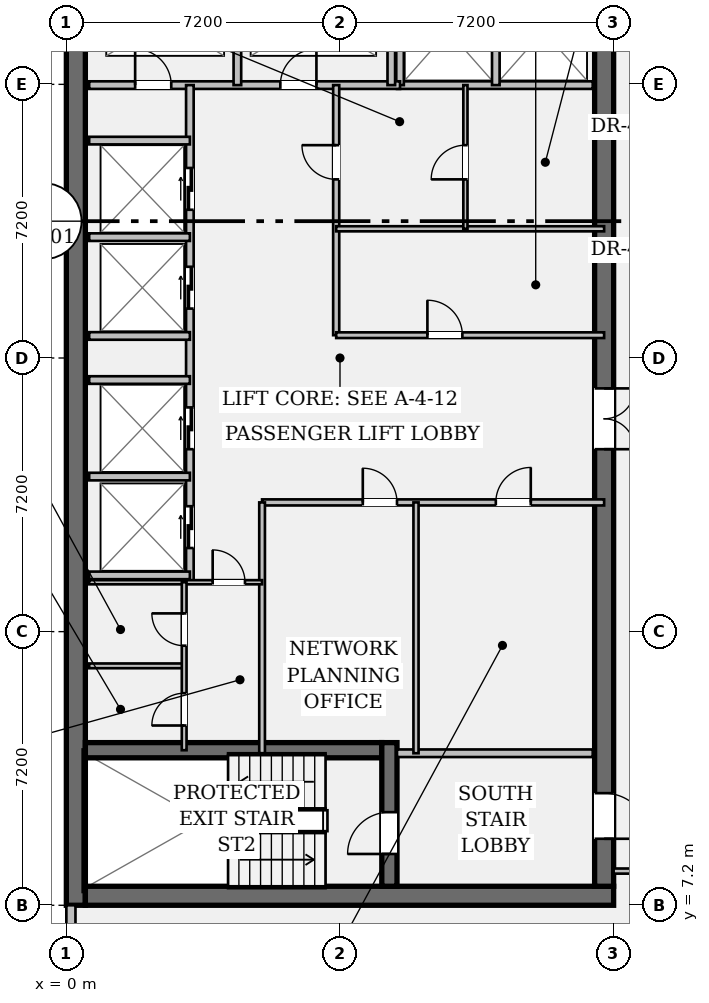
"""IFC4 building model, lengths in metres.
Left out: names, types, materials, properties, quantities, classifications, styles, units other than length and angle.
Written with IfcOpenShell. Run it as: python <this file> out.ifc"""

import sys

from ifc_helpers import new_model, si_unit, direction, frame, frame_2d, origin, place, context, subcontext, project, spatial, rectangle, extrude, element, fill, save


model = new_model("IFC4")
c1 = context("Model", 3, precision=1e-05, world=origin(), true_north=direction((0.0, 1.0)))
c2 = subcontext(c1, "Body", "Model", "MODEL_VIEW")
j1 = project(units=[si_unit("LENGTHUNIT", "METRE"), si_unit("PLANEANGLEUNIT", "RADIAN")], contexts=[c1])
p1 = place(None, origin())
s1 = spatial("IfcSite", under=j1, at=p1, CompositionType="ELEMENT")
p2 = place(p1, origin())
s2 = spatial("IfcBuilding", under=s1, at=p2, CompositionType="ELEMENT")
p3 = place(p2, frame((0.0, 0.0, 215.25)))
s3 = spatial("IfcBuildingStorey", under=s2, at=p3, CompositionType="ELEMENT", Elevation=215.25)
p4 = place(p3, frame((0.25, 7.2, 0.0), z_axis=(0.0, 0.0, 1.0), x_axis=(0.0, 1.0, 0.0)))
e1 = element("IfcWall", 1, at=p4, inside=s3, PredefinedType="SHEAR", context=c2, shape_type="SweptSolid", body=[
    extrude(rectangle(XDim=28.8, YDim=0.5, at=frame_2d((14.4, 0.0))), origin(), (0.0, 0.0, 1.0), 3.24),
])
p5 = place(p3, frame((0.5, 7.45, 0.0), z_axis=(0.0, 0.0, 1.0), x_axis=(1.0, 0.0, 0.0)))
e2 = element("IfcWall", 2, at=p5, inside=s3, PredefinedType="SHEAR", context=c2, shape_type="SweptSolid", body=[
    extrude(rectangle(XDim=13.9, YDim=0.5, at=frame_2d((6.95, 0.0))), origin(), (0.0, 0.0, 1.0), 3.24),
])
p6 = place(p3, frame((14.15, 35.5, 0.0), z_axis=(0.0, 0.0, 1.0), x_axis=(0.0, -1.0, 0.0)))
e3 = element("IfcWall", 3, at=p6, inside=s3, PredefinedType="SHEAR", context=c2, shape_type="SweptSolid", body=[
    extrude(rectangle(XDim=27.8, YDim=0.5, at=frame_2d((13.9, 0.0))), origin(), (0.0, 0.0, 1.0), 3.24),
])
p7 = place(p6, frame((1.4, 0.0, 0.0)))
e4 = element("IfcOpeningElement", 4, at=p7, cuts=e3, PredefinedType="OPENING", context=c2, shape_type="SweptSolid", body=[
    extrude(rectangle(XDim=1.2, YDim=2.15, at=frame_2d((0.6, 1.075))), frame((0.0, 0.262, 0.0), z_axis=(0.0, -1.0, 0.0), x_axis=(1.0, 0.0, 0.0)), (0.0, 0.0, 1.0), 0.524),
])
p8 = place(p6, frame((25.35, 0.0, 0.0)))
e5 = element("IfcOpeningElement", 5, at=p8, cuts=e3, PredefinedType="OPENING", context=c2, shape_type="SweptSolid", body=[
    extrude(rectangle(XDim=1.2, YDim=2.15, at=frame_2d((0.6, 1.075))), frame((0.0, 0.262, 0.0), z_axis=(0.0, -1.0, 0.0), x_axis=(1.0, 0.0, 0.0)), (0.0, 0.0, 1.0), 0.524),
])
p9 = place(p6, frame((14.7, 0.0, 0.0)))
e6 = element("IfcOpeningElement", 6, at=p9, cuts=e3, PredefinedType="OPENING", context=c2, shape_type="SweptSolid", body=[
    extrude(rectangle(XDim=1.6, YDim=2.2, at=frame_2d((0.8, 1.1))), frame((0.0, 0.262, 0.0), z_axis=(0.0, -1.0, 0.0), x_axis=(1.0, 0.0, 0.0)), (0.0, 0.0, 1.0), 0.524),
])
p10 = place(p3, frame((0.5, 11.28, 0.0), z_axis=(0.0, 0.0, 1.0), x_axis=(1.0, 0.0, 0.0)))
e7 = element("IfcWall", 7, at=p10, inside=s3, PredefinedType="SHEAR", context=c2, shape_type="SweptSolid", body=[
    extrude(rectangle(XDim=7.8, YDim=0.4, at=frame_2d((3.9, 0.0))), origin(), (0.0, 0.0, 1.0), 3.24),
])
p11 = place(p3, frame((8.5, 7.7, 0.0), z_axis=(0.0, 0.0, 1.0), x_axis=(0.0, 1.0, 0.0)))
e8 = element("IfcWall", 8, at=p11, inside=s3, PredefinedType="SHEAR", context=c2, shape_type="SweptSolid", body=[
    extrude(rectangle(XDim=3.78, YDim=0.4, at=frame_2d((1.89, 0.0))), origin(), (0.0, 0.0, 1.0), 3.24),
])
p12 = place(p11, frame((0.85, 0.0, 0.0)))
e9 = element("IfcOpeningElement", 9, at=p12, cuts=e8, PredefinedType="OPENING", context=c2, shape_type="SweptSolid", body=[
    extrude(rectangle(XDim=1.1, YDim=2.15, at=frame_2d((0.55, 1.075))), frame((0.0, 0.212, 0.0), z_axis=(0.0, -1.0, 0.0), x_axis=(1.0, 0.0, 0.0)), (0.0, 0.0, 1.0), 0.424),
])
p13 = place(p3, frame((0.12, 5.95, 0.0), z_axis=(0.0, 0.0, 1.0), x_axis=(0.0, 1.0, 0.0)))
e10 = element("IfcWall", 10, at=p13, inside=s3, PredefinedType="STANDARD", context=c2, shape_type="SweptSolid", body=[
    extrude(rectangle(XDim=1.25, YDim=0.24, at=frame_2d((0.625, 0.0))), origin(), (0.0, 0.0, 1.0), 3.24),
])
for number, where, z_axis, x_axis in (
    (11, (8.7, 11.2, 0.0), (0.0, 0.0, 1.0), (1.0, 0.0, 0.0)),
    (12, (8.7, 28.78, 0.0), (0.0, 0.0, 1.0), (1.0, 0.0, 0.0)),
):
    element("IfcWall", number, at=place(p3, frame(where, z_axis=z_axis, x_axis=x_axis)), inside=s3, PredefinedType="PARTITIONING", context=c2, shape_type="SweptSolid", body=[
        extrude(rectangle(XDim=5.15, YDim=0.2, at=frame_2d((2.575, 0.0))), origin(), (0.0, 0.0, 1.0), 3.24),
    ])
for number, where, z_axis, x_axis in (
    (13, (8.78, 28.78, 0.0), (0.0, 0.0, 1.0), (0.0, 1.0, 0.0)),
    (14, (11.3, 28.78, 0.0), (0.0, 0.0, 1.0), (0.0, 1.0, 0.0)),
):
    element("IfcWall", number, at=place(p3, frame(where, z_axis=z_axis, x_axis=x_axis)), inside=s3, PredefinedType="PARTITIONING", context=c2, shape_type="SweptSolid", body=[
        extrude(rectangle(XDim=3.1, YDim=0.2, at=frame_2d((1.55, 0.0))), origin(), (0.0, 0.0, 1.0), 3.24),
    ])
p14 = place(p3, frame((0.6, 28.78, 0.0), z_axis=(0.0, 0.0, 1.0), x_axis=(1.0, 0.0, 0.0)))
e15 = element("IfcWall", 15, at=p14, inside=s3, PredefinedType="PARTITIONING", context=c2, shape_type="SweptSolid", body=[
    extrude(rectangle(XDim=8.18, YDim=0.2, at=frame_2d((4.09, 0.0))), origin(), (0.0, 0.0, 1.0), 3.24),
])
p15 = place(p14, frame((1.21, 0.0, 0.0)))
e16 = element("IfcOpeningElement", 16, at=p15, cuts=e15, PredefinedType="OPENING", context=c2, shape_type="SweptSolid", body=[
    extrude(rectangle(XDim=0.95, YDim=2.15, at=frame_2d((0.475, 1.075))), frame((0.0, 0.112, 0.0), z_axis=(0.0, -1.0, 0.0), x_axis=(1.0, 0.0, 0.0)), (0.0, 0.0, 1.0), 0.224),
])
p16 = place(p14, frame((5.03, 0.0, 0.0)))
e17 = element("IfcOpeningElement", 17, at=p16, cuts=e15, PredefinedType="OPENING", context=c2, shape_type="SweptSolid", body=[
    extrude(rectangle(XDim=0.95, YDim=2.15, at=frame_2d((0.475, 1.075))), frame((0.0, 0.112, 0.0), z_axis=(0.0, -1.0, 0.0), x_axis=(1.0, 0.0, 0.0)), (0.0, 0.0, 1.0), 0.224),
])
for number, where, z_axis, x_axis in (
    (18, (4.5, 28.78, 0.0), (0.0, 0.0, 1.0), (0.0, 1.0, 0.0)),
    (19, (8.55, 28.78, 0.0), (0.0, 0.0, 1.0), (0.0, 1.0, 0.0)),
):
    element("IfcWall", number, at=place(p3, frame(where, z_axis=z_axis, x_axis=x_axis)), inside=s3, PredefinedType="PARTITIONING", context=c2, shape_type="SweptSolid", body=[
        extrude(rectangle(XDim=2.94, YDim=0.2, at=frame_2d((1.47, 0.0))), origin(), (0.0, 0.0, 1.0), 3.24),
    ])
p17 = place(p3, frame((3.25, 15.7, 0.0), z_axis=(0.0, 0.0, 1.0), x_axis=(0.0, 1.0, 0.0)))
e20 = element("IfcWall", 20, at=p17, inside=s3, PredefinedType="PARTITIONING", context=c2, shape_type="SweptSolid", body=[
    extrude(rectangle(XDim=13.08, YDim=0.2, at=frame_2d((6.54, 0.0))), origin(), (0.0, 0.0, 1.0), 3.24),
])
p18 = place(p17, frame((0.9, 0.0, 0.0)))
e21 = element("IfcOpeningElement", 21, at=p18, cuts=e20, PredefinedType="OPENING", context=c2, shape_type="SweptSolid", body=[
    extrude(rectangle(XDim=1.1, YDim=2.2, at=frame_2d((0.55, 1.1))), frame((0.0, 0.112, 0.0), z_axis=(0.0, -1.0, 0.0), x_axis=(1.0, 0.0, 0.0)), (0.0, 0.0, 1.0), 0.224),
])
p19 = place(p17, frame((3.5, 0.0, 0.0)))
e22 = element("IfcOpeningElement", 22, at=p19, cuts=e20, PredefinedType="OPENING", context=c2, shape_type="SweptSolid", body=[
    extrude(rectangle(XDim=1.1, YDim=2.2, at=frame_2d((0.55, 1.1))), frame((0.0, 0.112, 0.0), z_axis=(0.0, -1.0, 0.0), x_axis=(1.0, 0.0, 0.0)), (0.0, 0.0, 1.0), 0.224),
])
p20 = place(p17, frame((7.2, 0.0, 0.0)))
e23 = element("IfcOpeningElement", 23, at=p20, cuts=e20, PredefinedType="OPENING", context=c2, shape_type="SweptSolid", body=[
    extrude(rectangle(XDim=1.1, YDim=2.2, at=frame_2d((0.55, 1.1))), frame((0.0, 0.112, 0.0), z_axis=(0.0, -1.0, 0.0), x_axis=(1.0, 0.0, 0.0)), (0.0, 0.0, 1.0), 0.224),
])
p21 = place(p17, frame((9.8, 0.0, 0.0)))
e24 = element("IfcOpeningElement", 24, at=p21, cuts=e20, PredefinedType="OPENING", context=c2, shape_type="SweptSolid", body=[
    extrude(rectangle(XDim=1.1, YDim=2.2, at=frame_2d((0.55, 1.1))), frame((0.0, 0.112, 0.0), z_axis=(0.0, -1.0, 0.0), x_axis=(1.0, 0.0, 0.0)), (0.0, 0.0, 1.0), 0.224),
])
for number, where, z_axis, x_axis in (
    (25, (0.6, 15.88, 0.0), (0.0, 0.0, 1.0), (1.0, 0.0, 0.0)),
    (26, (0.6, 18.48, 0.0), (0.0, 0.0, 1.0), (1.0, 0.0, 0.0)),
    (27, (0.6, 22.18, 0.0), (0.0, 0.0, 1.0), (1.0, 0.0, 0.0)),
    (28, (0.6, 24.78, 0.0), (0.0, 0.0, 1.0), (1.0, 0.0, 0.0)),
    (29, (0.6, 21.02, 0.0), (0.0, 0.0, 1.0), (1.0, 0.0, 0.0)),
    (30, (0.6, 27.32, 0.0), (0.0, 0.0, 1.0), (1.0, 0.0, 0.0)),
):
    element("IfcWall", number, at=place(p3, frame(where, z_axis=z_axis, x_axis=x_axis)), inside=s3, PredefinedType="PARTITIONING", context=c2, shape_type="SweptSolid", body=[
        extrude(rectangle(XDim=2.65, YDim=0.2, at=frame_2d((1.325, 0.0))), origin(), (0.0, 0.0, 1.0), 3.24),
    ])
p22 = place(p3, frame((7.1, 22.2, 0.0), z_axis=(0.0, 0.0, 1.0), x_axis=(0.0, 1.0, 0.0)))
e31 = element("IfcWall", 31, at=p22, inside=s3, PredefinedType="PARTITIONING", context=c2, shape_type="SweptSolid", body=[
    extrude(rectangle(XDim=6.58, YDim=0.16, at=frame_2d((3.29, 0.0))), origin(), (0.0, 0.0, 1.0), 3.24),
])
p23 = place(p22, frame((4.1, 0.0, 0.0)))
e32 = element("IfcOpeningElement", 32, at=p23, cuts=e31, PredefinedType="OPENING", context=c2, shape_type="SweptSolid", body=[
    extrude(rectangle(XDim=0.9, YDim=2.15, at=frame_2d((0.45, 1.075))), frame((0.0, 0.092, 0.0), z_axis=(0.0, -1.0, 0.0), x_axis=(1.0, 0.0, 0.0)), (0.0, 0.0, 1.0), 0.184),
])
p24 = place(p3, frame((7.1, 22.2, 0.0), z_axis=(0.0, 0.0, 1.0), x_axis=(1.0, 0.0, 0.0)))
e33 = element("IfcWall", 33, at=p24, inside=s3, PredefinedType="PARTITIONING", context=c2, shape_type="SweptSolid", body=[
    extrude(rectangle(XDim=7.05, YDim=0.15, at=frame_2d((3.525, 0.0))), origin(), (0.0, 0.0, 1.0), 3.24),
])
p25 = place(p24, frame((2.4, 0.0, 0.0)))
e34 = element("IfcOpeningElement", 34, at=p25, cuts=e33, PredefinedType="OPENING", context=c2, shape_type="SweptSolid", body=[
    extrude(rectangle(XDim=0.92, YDim=2.15, at=frame_2d((0.46, 1.075))), frame((0.0, 0.087, 0.0), z_axis=(0.0, -1.0, 0.0), x_axis=(1.0, 0.0, 0.0)), (0.0, 0.0, 1.0), 0.174),
])
p26 = place(p3, frame((7.1, 25.0, 0.0), z_axis=(0.0, 0.0, 1.0), x_axis=(1.0, 0.0, 0.0)))
e35 = element("IfcWall", 35, at=p26, inside=s3, PredefinedType="PARTITIONING", context=c2, shape_type="SweptSolid", body=[
    extrude(rectangle(XDim=7.05, YDim=0.135, at=frame_2d((3.525, 0.0))), origin(), (0.0, 0.0, 1.0), 3.24),
])
p27 = place(p3, frame((10.5, 25.0, 0.0), z_axis=(0.0, 0.0, 1.0), x_axis=(0.0, 1.0, 0.0)))
e36 = element("IfcWall", 36, at=p27, inside=s3, PredefinedType="PARTITIONING", context=c2, shape_type="SweptSolid", body=[
    extrude(rectangle(XDim=3.78, YDim=0.11, at=frame_2d((1.89, 0.0))), origin(), (0.0, 0.0, 1.0), 3.24),
])
p28 = place(p27, frame((1.3, 0.0, 0.0)))
e37 = element("IfcOpeningElement", 37, at=p28, cuts=e36, PredefinedType="OPENING", context=c2, shape_type="SweptSolid", body=[
    extrude(rectangle(XDim=0.9, YDim=2.15, at=frame_2d((0.45, 1.075))), frame((0.0, 0.067, 0.0), z_axis=(0.0, -1.0, 0.0), x_axis=(1.0, 0.0, 0.0)), (0.0, 0.0, 1.0), 0.134),
])
p29 = place(p3, frame((5.15, 17.8, 0.0), z_axis=(0.0, 0.0, 1.0), x_axis=(1.0, 0.0, 0.0)))
e38 = element("IfcWall", 38, at=p29, inside=s3, PredefinedType="PARTITIONING", context=c2, shape_type="SweptSolid", body=[
    extrude(rectangle(XDim=9.0, YDim=0.16, at=frame_2d((4.5, 0.0))), origin(), (0.0, 0.0, 1.0), 3.24),
])
p30 = place(p29, frame((2.65, 0.0, 0.0)))
e39 = element("IfcOpeningElement", 39, at=p30, cuts=e38, PredefinedType="OPENING", context=c2, shape_type="SweptSolid", body=[
    extrude(rectangle(XDim=0.9, YDim=2.15, at=frame_2d((0.45, 1.075))), frame((0.0, 0.092, 0.0), z_axis=(0.0, -1.0, 0.0), x_axis=(1.0, 0.0, 0.0)), (0.0, 0.0, 1.0), 0.184),
])
p31 = place(p29, frame((6.15, 0.0, 0.0)))
e40 = element("IfcOpeningElement", 40, at=p31, cuts=e38, PredefinedType="OPENING", context=c2, shape_type="SweptSolid", body=[
    extrude(rectangle(XDim=0.92, YDim=2.15, at=frame_2d((0.46, 1.075))), frame((0.0, 0.092, 0.0), z_axis=(0.0, -1.0, 0.0), x_axis=(1.0, 0.0, 0.0)), (0.0, 0.0, 1.0), 0.184),
])
p32 = place(p3, frame((5.15, 11.2, 0.0), z_axis=(0.0, 0.0, 1.0), x_axis=(0.0, 1.0, 0.0)))
e41 = element("IfcWall", 41, at=p32, inside=s3, PredefinedType="PARTITIONING", context=c2, shape_type="SweptSolid", body=[
    extrude(rectangle(XDim=6.6, YDim=0.15, at=frame_2d((3.3, 0.0))), origin(), (0.0, 0.0, 1.0), 3.24),
])
p33 = place(p3, frame((9.2, 11.2, 0.0), z_axis=(0.0, 0.0, 1.0), x_axis=(0.0, 1.0, 0.0)))
e42 = element("IfcWall", 42, at=p33, inside=s3, PredefinedType="PARTITIONING", context=c2, shape_type="SweptSolid", body=[
    extrude(rectangle(XDim=6.6, YDim=0.135, at=frame_2d((3.3, 0.0))), origin(), (0.0, 0.0, 1.0), 3.24),
])
p34 = place(p3, frame((0.6, 15.7, 0.0), z_axis=(0.0, 0.0, 1.0), x_axis=(1.0, 0.0, 0.0)))
e43 = element("IfcWall", 43, at=p34, inside=s3, PredefinedType="PARTITIONING", context=c2, shape_type="SweptSolid", body=[
    extrude(rectangle(XDim=4.55, YDim=0.11, at=frame_2d((2.275, 0.0))), origin(), (0.0, 0.0, 1.0), 3.24),
])
p35 = place(p34, frame((3.25, 0.0, 0.0)))
e44 = element("IfcOpeningElement", 44, at=p35, cuts=e43, PredefinedType="OPENING", context=c2, shape_type="SweptSolid", body=[
    extrude(rectangle(XDim=0.85, YDim=2.15, at=frame_2d((0.425, 1.075))), frame((0.0, 0.067, 0.0), z_axis=(0.0, -1.0, 0.0), x_axis=(1.0, 0.0, 0.0)), (0.0, 0.0, 1.0), 0.134),
])
p36 = place(p3, frame((0.6, 13.5, 0.0), z_axis=(0.0, 0.0, 1.0), x_axis=(1.0, 0.0, 0.0)))
e45 = element("IfcWall", 45, at=p36, inside=s3, PredefinedType="PARTITIONING", context=c2, shape_type="SweptSolid", body=[
    extrude(rectangle(XDim=2.5, YDim=0.125, at=frame_2d((1.25, 0.0))), origin(), (0.0, 0.0, 1.0), 3.24),
])
p37 = place(p3, frame((3.1, 11.28, 0.0), z_axis=(0.0, 0.0, 1.0), x_axis=(0.0, 1.0, 0.0)))
e46 = element("IfcWall", 46, at=p37, inside=s3, PredefinedType="PARTITIONING", context=c2, shape_type="SweptSolid", body=[
    extrude(rectangle(XDim=4.42, YDim=0.125, at=frame_2d((2.21, 0.0))), origin(), (0.0, 0.0, 1.0), 3.24),
])
p38 = place(p37, frame((0.65, 0.0, 0.0)))
e47 = element("IfcOpeningElement", 47, at=p38, cuts=e46, PredefinedType="OPENING", context=c2, shape_type="SweptSolid", body=[
    extrude(rectangle(XDim=0.85, YDim=2.15, at=frame_2d((0.425, 1.075))), frame((0.0, 0.074, 0.0), z_axis=(0.0, -1.0, 0.0), x_axis=(1.0, 0.0, 0.0)), (0.0, 0.0, 1.0), 0.149),
])
p39 = place(p37, frame((2.75, 0.0, 0.0)))
e48 = element("IfcOpeningElement", 48, at=p39, cuts=e46, PredefinedType="OPENING", context=c2, shape_type="SweptSolid", body=[
    extrude(rectangle(XDim=0.85, YDim=2.15, at=frame_2d((0.425, 1.075))), frame((0.0, 0.074, 0.0), z_axis=(0.0, -1.0, 0.0), x_axis=(1.0, 0.0, 0.0)), (0.0, 0.0, 1.0), 0.149),
])
p40 = place(p3, frame((14.4, 8.1, 0.0), z_axis=(0.0, 0.0, 1.0), x_axis=(1.0, 0.0, 0.0)))
e49 = element("IfcWall", 49, at=p40, inside=s3, PredefinedType="PARTITIONING", context=c2, shape_type="SweptSolid", body=[
    extrude(rectangle(XDim=2.95, YDim=0.135, at=frame_2d((1.475, 0.0))), origin(), (0.0, 0.0, 1.0), 2.808),
])
p41 = place(p40, frame((0.95, 0.0, 0.0)))
e50 = element("IfcOpeningElement", 50, at=p41, cuts=e49, PredefinedType="OPENING", context=c2, shape_type="SweptSolid", body=[
    extrude(rectangle(XDim=0.92, YDim=2.15, at=frame_2d((0.46, 1.075))), frame((0.0, 0.08, 0.0), z_axis=(0.0, -1.0, 0.0), x_axis=(1.0, 0.0, 0.0)), (0.0, 0.0, 1.0), 0.159),
])
p42 = place(p12, origin())
e51 = element("IfcDoor", 51, at=p42, inside=s3, OperationType="SINGLE_SWING_LEFT", PredefinedType="DOOR", context=c2, shape_type="SweptSolid", body=[
    extrude(rectangle(XDim=1.1, YDim=2.15, at=frame_2d((0.55, 1.075))), frame((0.0, 0.025, 0.0), z_axis=(0.0, -1.0, 0.0), x_axis=(1.0, 0.0, 0.0)), (0.0, 0.0, 1.0), 0.05),
])
fill(e9, e51)
p43 = place(p8, origin())
e52 = element("IfcDoor", 52, at=p43, inside=s3, OperationType="SINGLE_SWING_RIGHT", PredefinedType="DOOR", context=c2, shape_type="SweptSolid", body=[
    extrude(rectangle(XDim=1.2, YDim=2.15, at=frame_2d((0.6, 1.075))), frame((0.0, 0.025, 0.0), z_axis=(0.0, -1.0, 0.0), x_axis=(1.0, 0.0, 0.0)), (0.0, 0.0, 1.0), 0.05),
])
fill(e5, e52)
p44 = place(p15, origin())
e53 = element("IfcDoor", 53, at=p44, inside=s3, OperationType="SINGLE_SWING_LEFT", PredefinedType="DOOR", context=c2, shape_type="SweptSolid", body=[
    extrude(rectangle(XDim=0.95, YDim=2.15, at=frame_2d((0.475, 1.075))), frame((0.0, 0.025, 0.0), z_axis=(0.0, -1.0, 0.0), x_axis=(1.0, 0.0, 0.0)), (0.0, 0.0, 1.0), 0.05),
])
fill(e16, e53)
p45 = place(p16, origin())
e54 = element("IfcDoor", 54, at=p45, inside=s3, OperationType="SINGLE_SWING_RIGHT", PredefinedType="DOOR", context=c2, shape_type="SweptSolid", body=[
    extrude(rectangle(XDim=0.95, YDim=2.15, at=frame_2d((0.475, 1.075))), frame((0.0, 0.025, 0.0), z_axis=(0.0, -1.0, 0.0), x_axis=(1.0, 0.0, 0.0)), (0.0, 0.0, 1.0), 0.05),
])
fill(e17, e54)
p46 = place(p9, origin())
e55 = element("IfcDoor", 55, at=p46, inside=s3, OperationType="DOUBLE_DOOR_SINGLE_SWING", PredefinedType="DOOR", context=c2, shape_type="SweptSolid", body=[
    extrude(rectangle(XDim=1.6, YDim=2.2, at=frame_2d((0.8, 1.1))), frame((0.0, 0.025, 0.0), z_axis=(0.0, -1.0, 0.0), x_axis=(1.0, 0.0, 0.0)), (0.0, 0.0, 1.0), 0.05),
])
fill(e6, e55)
p47 = place(p18, origin())
e56 = element("IfcDoor", 56, at=p47, inside=s3, OperationType="DOUBLE_DOOR_SLIDING", PredefinedType="DOOR", context=c2, shape_type="SweptSolid", body=[
    extrude(rectangle(XDim=1.1, YDim=2.2, at=frame_2d((0.55, 1.1))), frame((0.0, 0.025, 0.0), z_axis=(0.0, -1.0, 0.0), x_axis=(1.0, 0.0, 0.0)), (0.0, 0.0, 1.0), 0.05),
])
fill(e21, e56)
p48 = place(p19, origin())
e57 = element("IfcDoor", 57, at=p48, inside=s3, OperationType="DOUBLE_DOOR_SLIDING", PredefinedType="DOOR", context=c2, shape_type="SweptSolid", body=[
    extrude(rectangle(XDim=1.1, YDim=2.2, at=frame_2d((0.55, 1.1))), frame((0.0, 0.025, 0.0), z_axis=(0.0, -1.0, 0.0), x_axis=(1.0, 0.0, 0.0)), (0.0, 0.0, 1.0), 0.05),
])
fill(e22, e57)
p49 = place(p20, origin())
e58 = element("IfcDoor", 58, at=p49, inside=s3, OperationType="DOUBLE_DOOR_SLIDING", PredefinedType="DOOR", context=c2, shape_type="SweptSolid", body=[
    extrude(rectangle(XDim=1.1, YDim=2.2, at=frame_2d((0.55, 1.1))), frame((0.0, 0.025, 0.0), z_axis=(0.0, -1.0, 0.0), x_axis=(1.0, 0.0, 0.0)), (0.0, 0.0, 1.0), 0.05),
])
fill(e23, e58)
p50 = place(p21, origin())
e59 = element("IfcDoor", 59, at=p50, inside=s3, OperationType="DOUBLE_DOOR_SLIDING", PredefinedType="DOOR", context=c2, shape_type="SweptSolid", body=[
    extrude(rectangle(XDim=1.1, YDim=2.2, at=frame_2d((0.55, 1.1))), frame((0.0, 0.025, 0.0), z_axis=(0.0, -1.0, 0.0), x_axis=(1.0, 0.0, 0.0)), (0.0, 0.0, 1.0), 0.05),
])
fill(e24, e59)
p51 = place(p25, origin())
e60 = element("IfcDoor", 60, at=p51, inside=s3, OperationType="SINGLE_SWING_LEFT", PredefinedType="DOOR", context=c2, shape_type="SweptSolid", body=[
    extrude(rectangle(XDim=0.92, YDim=2.15, at=frame_2d((0.46, 1.075))), frame((0.0, 0.025, 0.0), z_axis=(0.0, -1.0, 0.0), x_axis=(1.0, 0.0, 0.0)), (0.0, 0.0, 1.0), 0.05),
])
fill(e34, e60)
p52 = place(p23, origin())
e61 = element("IfcDoor", 61, at=p52, inside=s3, OperationType="SINGLE_SWING_RIGHT", PredefinedType="DOOR", context=c2, shape_type="SweptSolid", body=[
    extrude(rectangle(XDim=0.9, YDim=2.15, at=frame_2d((0.45, 1.075))), frame((0.0, 0.025, 0.0), z_axis=(0.0, -1.0, 0.0), x_axis=(1.0, 0.0, 0.0)), (0.0, 0.0, 1.0), 0.05),
])
fill(e32, e61)
p53 = place(p28, origin())
e62 = element("IfcDoor", 62, at=p53, inside=s3, OperationType="SINGLE_SWING_LEFT", PredefinedType="DOOR", context=c2, shape_type="SweptSolid", body=[
    extrude(rectangle(XDim=0.9, YDim=2.15, at=frame_2d((0.45, 1.075))), frame((0.0, 0.025, 0.0), z_axis=(0.0, -1.0, 0.0), x_axis=(1.0, 0.0, 0.0)), (0.0, 0.0, 1.0), 0.05),
])
fill(e37, e62)
p54 = place(p30, origin())
e63 = element("IfcDoor", 63, at=p54, inside=s3, OperationType="SINGLE_SWING_LEFT", PredefinedType="DOOR", context=c2, shape_type="SweptSolid", body=[
    extrude(rectangle(XDim=0.9, YDim=2.15, at=frame_2d((0.45, 1.075))), frame((0.0, 0.025, 0.0), z_axis=(0.0, -1.0, 0.0), x_axis=(1.0, 0.0, 0.0)), (0.0, 0.0, 1.0), 0.05),
])
fill(e39, e63)
p55 = place(p31, origin())
e64 = element("IfcDoor", 64, at=p55, inside=s3, OperationType="SINGLE_SWING_RIGHT", PredefinedType="DOOR", context=c2, shape_type="SweptSolid", body=[
    extrude(rectangle(XDim=0.92, YDim=2.15, at=frame_2d((0.46, 1.075))), frame((0.0, 0.025, 0.0), z_axis=(0.0, -1.0, 0.0), x_axis=(1.0, 0.0, 0.0)), (0.0, 0.0, 1.0), 0.05),
])
fill(e40, e64)
p56 = place(p35, origin())
e65 = element("IfcDoor", 65, at=p56, inside=s3, OperationType="SINGLE_SWING_LEFT", PredefinedType="DOOR", context=c2, shape_type="SweptSolid", body=[
    extrude(rectangle(XDim=0.85, YDim=2.15, at=frame_2d((0.425, 1.075))), frame((0.0, 0.025, 0.0), z_axis=(0.0, -1.0, 0.0), x_axis=(1.0, 0.0, 0.0)), (0.0, 0.0, 1.0), 0.05),
])
fill(e44, e65)
p57 = place(p38, origin())
e66 = element("IfcDoor", 66, at=p57, inside=s3, OperationType="SINGLE_SWING_LEFT", PredefinedType="DOOR", context=c2, shape_type="SweptSolid", body=[
    extrude(rectangle(XDim=0.85, YDim=2.15, at=frame_2d((0.425, 1.075))), frame((0.0, 0.025, 0.0), z_axis=(0.0, -1.0, 0.0), x_axis=(1.0, 0.0, 0.0)), (0.0, 0.0, 1.0), 0.05),
])
fill(e47, e66)
p58 = place(p39, origin())
e67 = element("IfcDoor", 67, at=p58, inside=s3, OperationType="SINGLE_SWING_RIGHT", PredefinedType="DOOR", context=c2, shape_type="SweptSolid", body=[
    extrude(rectangle(XDim=0.85, YDim=2.15, at=frame_2d((0.425, 1.075))), frame((0.0, 0.025, 0.0), z_axis=(0.0, -1.0, 0.0), x_axis=(1.0, 0.0, 0.0)), (0.0, 0.0, 1.0), 0.05),
])
fill(e48, e67)
save(model, sys.argv[1])
